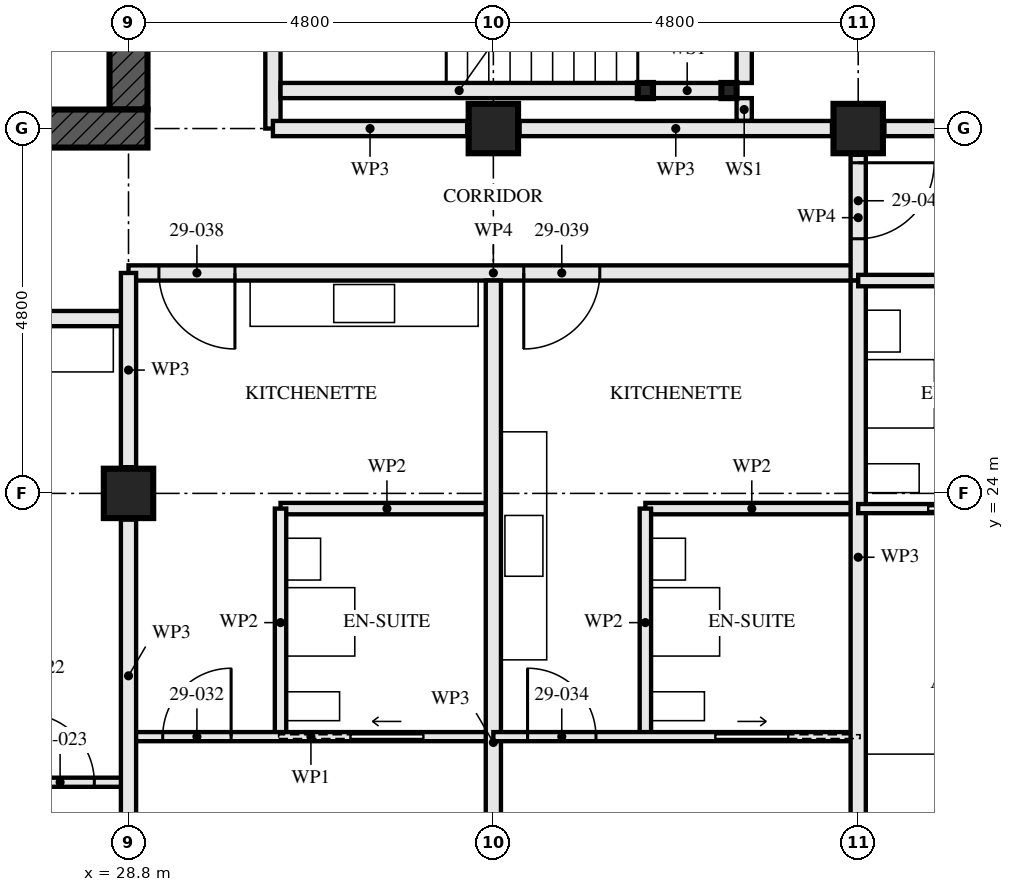
"""IFC4 building model, lengths in metres.
Left out: names, types, materials, properties, quantities, classifications, styles, units other than length and angle.
Written with IfcOpenShell. Run it as: python <this file> out.ifc"""

import sys

from ifc_helpers import new_model, si_unit, direction, frame, frame_2d, origin, origin_2d, place, context, subcontext, project, spatial, rectangle, hollow_rectangle, extrude, element, fill, save


model = new_model("IFC4")
c1 = context("Model", 3, precision=1e-05, world=origin(), true_north=direction((0.0, 1.0)))
c2 = subcontext(c1, "Body", "Model", "MODEL_VIEW")
j1 = project(units=[si_unit("LENGTHUNIT", "METRE"), si_unit("PLANEANGLEUNIT", "RADIAN")], contexts=[c1])
p1 = place(None, origin())
s1 = spatial("IfcSite", under=j1, at=p1, CompositionType="ELEMENT")
p2 = place(p1, origin())
s2 = spatial("IfcBuilding", under=s1, at=p2, CompositionType="ELEMENT")
p3 = place(p2, frame((0.0, 0.0, 108.5)))
s3 = spatial("IfcBuildingStorey", under=s2, at=p3, CompositionType="ELEMENT", Elevation=108.5)
for number, where, z_axis, x_axis in (
    (1, (28.8, 24.0, 0.0), (0.0, 0.0, 1.0), (1.0, 0.0, 0.0)),
    (2, (33.6, 28.8, 0.0), (0.0, 0.0, 1.0), (0.0, 1.0, 0.0)),
    (3, (38.4, 28.8, 0.0), (0.0, 0.0, 1.0), (0.0, 1.0, 0.0)),
):
    element("IfcColumn", number, at=place(p3, frame(where, z_axis=z_axis, x_axis=x_axis)), inside=s3, PredefinedType="COLUMN", context=c2, shape_type="SweptSolid", body=[
        extrude(hollow_rectangle(XDim=0.65, YDim=0.65, WallThickness=0.05, at=origin_2d()), origin(), (0.0, 0.0, 1.0), 3.5),
    ])
p4 = place(p3, frame((14.15, 28.8, -0.17), z_axis=(0.0, 0.0, 1.0), x_axis=(1.0, 0.0, 0.0)))
e4 = element("IfcWall", 4, at=p4, inside=s3, PredefinedType="SHEAR", context=c2, shape_type="SweptSolid", body=[
    extrude(rectangle(XDim=14.9, YDim=0.5, at=frame_2d((7.45, 0.0))), origin(), (0.0, 0.0, 1.0), 3.5),
])
p5 = place(p4, frame((6.85, 0.0, 0.17)))
e5 = element("IfcOpeningElement", 5, at=p5, cuts=e4, PredefinedType="OPENING", context=c2, shape_type="SweptSolid", body=[
    extrude(rectangle(XDim=1.2, YDim=2.1, at=frame_2d((0.6, 1.05))), frame((0.0, 0.26, 0.0), z_axis=(0.0, -1.0, 0.0), x_axis=(1.0, 0.0, 0.0)), (0.0, 0.0, 1.0), 0.521),
])
p6 = place(p3, frame((28.8, 29.05, -0.17), z_axis=(0.0, 0.0, 1.0), x_axis=(0.0, 1.0, 0.0)))
e6 = element("IfcWall", 6, at=p6, inside=s3, PredefinedType="SHEAR", context=c2, shape_type="SweptSolid", body=[
    extrude(rectangle(XDim=13.9, YDim=0.5, at=frame_2d((6.95, 0.0))), origin(), (0.0, 0.0, 1.0), 3.5),
])
p7 = place(p6, frame((6.35, 0.0, 0.17)))
e7 = element("IfcOpeningElement", 7, at=p7, cuts=e6, PredefinedType="OPENING", context=c2, shape_type="SweptSolid", body=[
    extrude(rectangle(XDim=1.2, YDim=2.1, at=frame_2d((0.6, 1.05))), frame((0.0, 0.26, 0.0), z_axis=(0.0, -1.0, 0.0), x_axis=(1.0, 0.0, 0.0)), (0.0, 0.0, 1.0), 0.521),
])
for number, where, z_axis, x_axis in (
    (8, (36.7, 29.3, 0.0), (0.0, 0.0, 1.0), (1.0, 0.0, 0.0)),
    (9, (35.6, 29.3, 0.0), (0.0, 0.0, 1.0), (1.0, 0.0, 0.0)),
):
    element("IfcColumn", number, at=place(p3, frame(where, z_axis=z_axis, x_axis=x_axis)), inside=s3, PredefinedType="COLUMN", context=c2, shape_type="SweptSolid", body=[
        extrude(hollow_rectangle(XDim=0.2, YDim=0.2, WallThickness=0.008, at=origin_2d()), origin(), (0.0, 0.0, 1.0), 3.33),
    ])
p8 = place(p3, frame((24.0, 20.2, 0.0), z_axis=(0.0, 0.0, 1.0), x_axis=(1.0, 0.0, 0.0)))
e10 = element("IfcWall", 10, at=p8, inside=s3, PredefinedType="PARTITIONING", context=c2, shape_type="SweptSolid", body=[
    extrude(rectangle(XDim=4.8, YDim=0.12, at=frame_2d((2.4, 0.0))), origin(), (0.0, 0.0, 1.0), 3.33),
])
p9 = place(p8, frame((3.45, 0.0, 0.0)))
e11 = element("IfcOpeningElement", 11, at=p9, cuts=e10, PredefinedType="OPENING", context=c2, shape_type="SweptSolid", body=[
    extrude(rectangle(XDim=0.9, YDim=2.1, at=frame_2d((0.45, 1.05))), frame((0.0, 0.071, 0.0), z_axis=(0.0, -1.0, 0.0), x_axis=(1.0, 0.0, 0.0)), (0.0, 0.0, 1.0), 0.141),
])
p10 = place(p3, frame((17.8, 26.3, 0.0), z_axis=(0.0, 0.0, 1.0), x_axis=(1.0, 0.0, 0.0)))
e12 = element("IfcWall", 12, at=p10, inside=s3, PredefinedType="PARTITIONING", context=c2, shape_type="SweptSolid", body=[
    extrude(rectangle(XDim=11.0, YDim=0.2, at=frame_2d((5.5, 0.0))), origin(), (0.0, 0.0, 1.0), 2.55),
])
p11 = place(p10, frame((0.06, 0.0, 0.0)))
e13 = element("IfcOpeningElement", 13, at=p11, cuts=e12, PredefinedType="OPENING", context=c2, shape_type="SweptSolid", body=[
    extrude(rectangle(XDim=1.0, YDim=2.1, at=frame_2d((0.5, 1.05))), frame((0.0, 0.111, 0.0), z_axis=(0.0, -1.0, 0.0), x_axis=(1.0, 0.0, 0.0)), (0.0, 0.0, 1.0), 0.221),
])
p12 = place(p10, frame((6.6, 0.0, 0.0)))
e14 = element("IfcOpeningElement", 14, at=p12, cuts=e12, PredefinedType="OPENING", context=c2, shape_type="SweptSolid", body=[
    extrude(rectangle(XDim=1.0, YDim=2.1, at=frame_2d((0.5, 1.05))), frame((0.0, 0.111, 0.0), z_axis=(0.0, -1.0, 0.0), x_axis=(1.0, 0.0, 0.0)), (0.0, 0.0, 1.0), 0.221),
])
p13 = place(p3, frame((30.8, 20.8, 0.0), z_axis=(0.0, 0.0, 1.0), x_axis=(0.0, 1.0, 0.0)))
e15 = element("IfcWall", 15, at=p13, inside=s3, PredefinedType="PARTITIONING", context=c2, shape_type="SweptSolid", body=[
    extrude(rectangle(XDim=3.0, YDim=0.15, at=frame_2d((1.5, 0.0))), origin(), (0.0, 0.0, 1.0), 3.33),
])
p14 = place(p3, frame((30.8, 23.8, 0.0), z_axis=(0.0, 0.0, 1.0), x_axis=(1.0, 0.0, 0.0)))
e16 = element("IfcWall", 16, at=p14, inside=s3, PredefinedType="PARTITIONING", context=c2, shape_type="SweptSolid", body=[
    extrude(rectangle(XDim=2.8, YDim=0.15, at=frame_2d((1.4, 0.0))), origin(), (0.0, 0.0, 1.0), 3.33),
])
p15 = place(p3, frame((28.8, 20.8, 0.0), z_axis=(0.0, 0.0, 1.0), x_axis=(1.0, 0.0, 0.0)))
e17 = element("IfcWall", 17, at=p15, inside=s3, PredefinedType="PARTITIONING", context=c2, shape_type="SweptSolid", body=[
    extrude(rectangle(XDim=4.8, YDim=0.12, at=frame_2d((2.4, 0.0))), origin(), (0.0, 0.0, 1.0), 3.33),
])
p16 = place(p15, frame((0.45, 0.0, 0.0)))
e18 = element("IfcOpeningElement", 18, at=p16, cuts=e17, PredefinedType="OPENING", context=c2, shape_type="SweptSolid", body=[
    extrude(rectangle(XDim=0.9, YDim=2.1, at=frame_2d((0.45, 1.05))), frame((0.0, 0.071, 0.0), z_axis=(0.0, -1.0, 0.0), x_axis=(1.0, 0.0, 0.0)), (0.0, 0.0, 1.0), 0.141),
])
p17 = place(p15, frame((2.925, 0.0, 0.0)))
e19 = element("IfcOpeningElement", 19, at=p17, cuts=e17, PredefinedType="OPENING", context=c2, shape_type="SweptSolid", body=[
    extrude(rectangle(XDim=0.95, YDim=2.1, at=frame_2d((0.475, 1.05))), frame((0.0, 0.071, 0.0), z_axis=(0.0, -1.0, 0.0), x_axis=(1.0, 0.0, 0.0)), (0.0, 0.0, 1.0), 0.141),
])
p18 = place(p3, frame((33.6, 14.647, 0.0), z_axis=(0.0, 0.0, 1.0), x_axis=(0.0, 1.0, 0.0)))
e20 = element("IfcWall", 20, at=p18, inside=s3, PredefinedType="PARTITIONING", context=c2, shape_type="SweptSolid", body=[
    extrude(rectangle(XDim=12.153, YDim=0.2, at=frame_2d((6.077, 0.0))), origin(), (0.0, 0.0, 1.0), 2.55),
])
p19 = place(p3, frame((35.6, 20.8, 0.0), z_axis=(0.0, 0.0, 1.0), x_axis=(0.0, 1.0, 0.0)))
e21 = element("IfcWall", 21, at=p19, inside=s3, PredefinedType="PARTITIONING", context=c2, shape_type="SweptSolid", body=[
    extrude(rectangle(XDim=3.0, YDim=0.15, at=frame_2d((1.5, 0.0))), origin(), (0.0, 0.0, 1.0), 3.33),
])
p20 = place(p3, frame((35.6, 23.8, 0.0), z_axis=(0.0, 0.0, 1.0), x_axis=(1.0, 0.0, 0.0)))
e22 = element("IfcWall", 22, at=p20, inside=s3, PredefinedType="PARTITIONING", context=c2, shape_type="SweptSolid", body=[
    extrude(rectangle(XDim=2.8, YDim=0.15, at=frame_2d((1.4, 0.0))), origin(), (0.0, 0.0, 1.0), 3.33),
])
p21 = place(p3, frame((33.6, 20.8, 0.0), z_axis=(0.0, 0.0, 1.0), x_axis=(1.0, 0.0, 0.0)))
e23 = element("IfcWall", 23, at=p21, inside=s3, PredefinedType="PARTITIONING", context=c2, shape_type="SweptSolid", body=[
    extrude(rectangle(XDim=4.8, YDim=0.12, at=frame_2d((2.4, 0.0))), origin(), (0.0, 0.0, 1.0), 3.33),
])
p22 = place(p21, frame((0.45, 0.0, 0.0)))
e24 = element("IfcOpeningElement", 24, at=p22, cuts=e23, PredefinedType="OPENING", context=c2, shape_type="SweptSolid", body=[
    extrude(rectangle(XDim=0.9, YDim=2.1, at=frame_2d((0.45, 1.05))), frame((0.0, 0.071, 0.0), z_axis=(0.0, -1.0, 0.0), x_axis=(1.0, 0.0, 0.0)), (0.0, 0.0, 1.0), 0.141),
])
p23 = place(p21, frame((2.925, 0.0, 0.0)))
e25 = element("IfcOpeningElement", 25, at=p23, cuts=e23, PredefinedType="OPENING", context=c2, shape_type="SweptSolid", body=[
    extrude(rectangle(XDim=0.95, YDim=2.1, at=frame_2d((0.475, 1.05))), frame((0.0, 0.071, 0.0), z_axis=(0.0, -1.0, 0.0), x_axis=(1.0, 0.0, 0.0)), (0.0, 0.0, 1.0), 0.141),
])
p24 = place(p3, frame((38.4, 19.52, 0.0), z_axis=(0.0, 0.0, 1.0), x_axis=(0.0, 1.0, 0.0)))
e26 = element("IfcWall", 26, at=p24, inside=s3, PredefinedType="PARTITIONING", context=c2, shape_type="SweptSolid", body=[
    extrude(rectangle(XDim=7.28, YDim=0.2, at=frame_2d((3.64, 0.0))), origin(), (0.0, 0.0, 1.0), 2.55),
])
p25 = place(p3, frame((38.4, 26.8, 0.0), z_axis=(0.0, 0.0, 1.0), x_axis=(1.0, 0.0, 0.0)))
e27 = element("IfcWall", 27, at=p25, inside=s3, PredefinedType="PARTITIONING", context=c2, shape_type="SweptSolid", body=[
    extrude(rectangle(XDim=2.8, YDim=0.15, at=frame_2d((1.4, 0.0))), origin(), (0.0, 0.0, 1.0), 3.33),
])
p26 = place(p3, frame((38.4, 23.8, 0.0), z_axis=(0.0, 0.0, 1.0), x_axis=(1.0, 0.0, 0.0)))
e28 = element("IfcWall", 28, at=p26, inside=s3, PredefinedType="PARTITIONING", context=c2, shape_type="SweptSolid", body=[
    extrude(rectangle(XDim=4.553, YDim=0.12, at=frame_2d((2.276, 0.0))), origin(), (0.0, 0.0, 1.0), 3.33),
])
p27 = place(p26, frame((2.975, 0.0, 0.0)))
e29 = element("IfcOpeningElement", 29, at=p27, cuts=e28, PredefinedType="OPENING", context=c2, shape_type="SweptSolid", body=[
    extrude(rectangle(XDim=0.9, YDim=2.1, at=frame_2d((0.45, 1.05))), frame((0.0, 0.071, 0.0), z_axis=(0.0, -1.0, 0.0), x_axis=(1.0, 0.0, 0.0)), (0.0, 0.0, 1.0), 0.141),
])
p28 = place(p26, frame((0.925, 0.0, 0.0)))
e30 = element("IfcOpeningElement", 30, at=p28, cuts=e28, PredefinedType="OPENING", context=c2, shape_type="SweptSolid", body=[
    extrude(rectangle(XDim=0.95, YDim=2.1, at=frame_2d((0.475, 1.05))), frame((0.0, 0.071, 0.0), z_axis=(0.0, -1.0, 0.0), x_axis=(1.0, 0.0, 0.0)), (0.0, 0.0, 1.0), 0.141),
])
p29 = place(p3, frame((28.8, 26.9, 0.0), z_axis=(0.0, 0.0, 1.0), x_axis=(1.0, 0.0, 0.0)))
e31 = element("IfcWall", 31, at=p29, inside=s3, PredefinedType="PARTITIONING", context=c2, shape_type="SweptSolid", body=[
    extrude(rectangle(XDim=9.6, YDim=0.2, at=frame_2d((4.8, 0.0))), origin(), (0.0, 0.0, 1.0), 3.33),
])
p30 = place(p29, frame((0.4, 0.0, 0.0)))
e32 = element("IfcOpeningElement", 32, at=p30, cuts=e31, PredefinedType="OPENING", context=c2, shape_type="SweptSolid", body=[
    extrude(rectangle(XDim=1.0, YDim=2.1, at=frame_2d((0.5, 1.05))), frame((0.0, 0.111, 0.0), z_axis=(0.0, -1.0, 0.0), x_axis=(1.0, 0.0, 0.0)), (0.0, 0.0, 1.0), 0.221),
])
p31 = place(p29, frame((5.2, 0.0, 0.0)))
e33 = element("IfcOpeningElement", 33, at=p31, cuts=e31, PredefinedType="OPENING", context=c2, shape_type="SweptSolid", body=[
    extrude(rectangle(XDim=1.0, YDim=2.1, at=frame_2d((0.5, 1.05))), frame((0.0, 0.111, 0.0), z_axis=(0.0, -1.0, 0.0), x_axis=(1.0, 0.0, 0.0)), (0.0, 0.0, 1.0), 0.221),
])
p32 = place(p3, frame((38.4, 26.8, 0.0), z_axis=(0.0, 0.0, 1.0), x_axis=(0.0, 1.0, 0.0)))
e34 = element("IfcWall", 34, at=p32, inside=s3, PredefinedType="PARTITIONING", context=c2, shape_type="SweptSolid", body=[
    extrude(rectangle(XDim=1.655, YDim=0.2, at=frame_2d((0.828, 0.0))), origin(), (0.0, 0.0, 1.0), 3.33),
])
p33 = place(p32, frame((0.55, 0.0, 0.0)))
e35 = element("IfcOpeningElement", 35, at=p33, cuts=e34, PredefinedType="OPENING", context=c2, shape_type="SweptSolid", body=[
    extrude(rectangle(XDim=1.0, YDim=2.1, at=frame_2d((0.5, 1.05))), frame((0.0, 0.111, 0.0), z_axis=(0.0, -1.0, 0.0), x_axis=(1.0, 0.0, 0.0)), (0.0, 0.0, 1.0), 0.221),
])
p34 = place(p3, frame((36.6, 29.3, 0.0), z_axis=(0.0, 0.0, 1.0), x_axis=(-1.0, 0.0, 0.0)))
e36 = element("IfcWall", 36, at=p34, inside=s3, PredefinedType="SOLIDWALL", context=c2, shape_type="SweptSolid", body=[
    extrude(rectangle(XDim=0.9, YDim=0.2, at=frame_2d((0.45, 0.0))), origin(), (0.0, 0.0, 1.0), 2.99),
])
p35 = place(p3, frame((35.5, 29.3, 0.0), z_axis=(0.0, 0.0, 1.0), x_axis=(-1.0, 0.0, 0.0)))
e37 = element("IfcWall", 37, at=p35, inside=s3, PredefinedType="SOLIDWALL", context=c2, shape_type="SweptSolid", body=[
    extrude(rectangle(XDim=4.7, YDim=0.2, at=frame_2d((2.35, 0.0))), origin(), (0.0, 0.0, 1.0), 2.99),
])
p36 = place(p3, frame((36.9, 28.9, 0.0), z_axis=(0.0, 0.0, 1.0), x_axis=(0.0, 1.0, 0.0)))
e38 = element("IfcWall", 38, at=p36, inside=s3, PredefinedType="SOLIDWALL", context=c2, shape_type="SweptSolid", body=[
    extrude(rectangle(XDim=0.3, YDim=0.2, at=frame_2d((0.15, 0.0))), origin(), (0.0, 0.0, 1.0), 3.33),
])
p37 = place(p3, frame((36.9, 29.4, 0.0), z_axis=(0.0, 0.0, 1.0), x_axis=(0.0, 1.0, 0.0)))
e39 = element("IfcWall", 39, at=p37, inside=s3, PredefinedType="SOLIDWALL", context=c2, shape_type="SweptSolid", body=[
    extrude(rectangle(XDim=2.6, YDim=0.2, at=frame_2d((1.3, 0.0))), origin(), (0.0, 0.0, 1.0), 3.33),
])
p38 = place(p3, frame((30.7, 28.8, 0.0), z_axis=(0.0, 0.0, 1.0), x_axis=(0.0, 1.0, 0.0)))
e40 = element("IfcWall", 40, at=p38, inside=s3, PredefinedType="PARTITIONING", context=c2, shape_type="SweptSolid", body=[
    extrude(rectangle(XDim=14.84, YDim=0.2, at=frame_2d((7.42, 0.0))), origin(), (0.0, 0.0, 1.0), 2.32),
])
p39 = place(p38, frame((1.4, 0.0, 0.0)))
e41 = element("IfcOpeningElement", 41, at=p39, cuts=e40, PredefinedType="OPENING", context=c2, shape_type="SweptSolid", body=[
    extrude(rectangle(XDim=1.0, YDim=2.1, at=frame_2d((0.5, 1.05))), frame((0.0, 0.111, 0.0), z_axis=(0.0, -1.0, 0.0), x_axis=(1.0, 0.0, 0.0)), (0.0, 0.0, 1.0), 0.221),
])
p40 = place(p38, frame((4.1, 0.0, 0.0)))
e42 = element("IfcOpeningElement", 42, at=p40, cuts=e40, PredefinedType="OPENING", context=c2, shape_type="SweptSolid", body=[
    extrude(rectangle(XDim=1.0, YDim=2.1, at=frame_2d((0.5, 1.05))), frame((0.0, 0.111, 0.0), z_axis=(0.0, -1.0, 0.0), x_axis=(1.0, 0.0, 0.0)), (0.0, 0.0, 1.0), 0.221),
])
p41 = place(p38, frame((5.975, 0.0, 0.0)))
e43 = element("IfcOpeningElement", 43, at=p41, cuts=e40, PredefinedType="OPENING", context=c2, shape_type="SweptSolid", body=[
    extrude(rectangle(XDim=1.0, YDim=2.1, at=frame_2d((0.5, 1.05))), frame((0.0, 0.111, 0.0), z_axis=(0.0, -1.0, 0.0), x_axis=(1.0, 0.0, 0.0)), (0.0, 0.0, 1.0), 0.221),
])
p42 = place(p38, frame((13.0, 0.0, 0.0)))
e44 = element("IfcOpeningElement", 44, at=p42, cuts=e40, PredefinedType="OPENING", context=c2, shape_type="SweptSolid", body=[
    extrude(rectangle(XDim=1.0, YDim=2.1, at=frame_2d((0.5, 1.05))), frame((0.0, 0.111, 0.0), z_axis=(0.0, -1.0, 0.0), x_axis=(1.0, 0.0, 0.0)), (0.0, 0.0, 1.0), 0.221),
])
p43 = place(p3, frame((28.8, 19.545, 0.0), z_axis=(0.0, 0.0, 1.0), x_axis=(0.0, 1.0, 0.0)))
e45 = element("IfcWall", 45, at=p43, inside=s3, PredefinedType="PARTITIONING", context=c2, shape_type="SweptSolid", body=[
    extrude(rectangle(XDim=4.11, YDim=0.2, at=frame_2d((2.055, 0.0))), origin(), (0.0, 0.0, 1.0), 2.32),
])
p44 = place(p3, frame((28.8, 24.345, 0.0), z_axis=(0.0, 0.0, 1.0), x_axis=(0.0, 1.0, 0.0)))
e46 = element("IfcWall", 46, at=p44, inside=s3, PredefinedType="PARTITIONING", context=c2, shape_type="SweptSolid", body=[
    extrude(rectangle(XDim=2.555, YDim=0.2, at=frame_2d((1.277, 0.0))), origin(), (0.0, 0.0, 1.0), 2.32),
])
p45 = place(p3, frame((42.896, 28.8, 0.0), z_axis=(0.0, 0.0, 1.0), x_axis=(-1.0, 0.0, 0.0)))
e47 = element("IfcWall", 47, at=p45, inside=s3, PredefinedType="PARTITIONING", context=c2, shape_type="SweptSolid", body=[
    extrude(rectangle(XDim=4.15, YDim=0.2, at=frame_2d((2.075, 0.0))), origin(), (0.0, 0.0, 1.0), 2.32),
])
p46 = place(p3, frame((38.055, 28.8, 0.0), z_axis=(0.0, 0.0, 1.0), x_axis=(-1.0, 0.0, 0.0)))
e48 = element("IfcWall", 48, at=p46, inside=s3, PredefinedType="PARTITIONING", context=c2, shape_type="SweptSolid", body=[
    extrude(rectangle(XDim=4.11, YDim=0.2, at=frame_2d((2.055, 0.0))), origin(), (0.0, 0.0, 1.0), 2.32),
])
p47 = place(p3, frame((33.255, 28.8, 0.0), z_axis=(0.0, 0.0, 1.0), x_axis=(-1.0, 0.0, 0.0)))
e49 = element("IfcWall", 49, at=p47, inside=s3, PredefinedType="PARTITIONING", context=c2, shape_type="SweptSolid", body=[
    extrude(rectangle(XDim=2.555, YDim=0.2, at=frame_2d((1.277, 0.0))), origin(), (0.0, 0.0, 1.0), 2.32),
])
p48 = place(p9, origin())
e50 = element("IfcDoor", 50, at=p48, inside=s3, OperationType="SINGLE_SWING_RIGHT", PredefinedType="DOOR", context=c2, shape_type="SweptSolid", body=[
    extrude(rectangle(XDim=0.9, YDim=2.1, at=frame_2d((0.45, 1.05))), frame((0.0, 0.022, 0.0), z_axis=(0.0, -1.0, 0.0), x_axis=(1.0, 0.0, 0.0)), (0.0, 0.0, 1.0), 0.044),
])
fill(e11, e50)
p49 = place(p16, origin())
e51 = element("IfcDoor", 51, at=p49, inside=s3, OperationType="SINGLE_SWING_LEFT", PredefinedType="DOOR", context=c2, shape_type="SweptSolid", body=[
    extrude(rectangle(XDim=0.9, YDim=2.1, at=frame_2d((0.45, 1.05))), frame((0.0, 0.022, 0.0), z_axis=(0.0, -1.0, 0.0), x_axis=(1.0, 0.0, 0.0)), (0.0, 0.0, 1.0), 0.044),
])
fill(e18, e51)
p50 = place(p17, origin())
e52 = element("IfcDoor", 52, at=p50, inside=s3, OperationType="SLIDING_TO_RIGHT", PredefinedType="DOOR", context=c2, shape_type="SweptSolid", body=[
    extrude(rectangle(XDim=0.95, YDim=2.1, at=frame_2d((0.475, 1.05))), frame((0.0, 0.022, 0.0), z_axis=(0.0, -1.0, 0.0), x_axis=(1.0, 0.0, 0.0)), (0.0, 0.0, 1.0), 0.044),
])
fill(e19, e52)
p51 = place(p22, origin())
e53 = element("IfcDoor", 53, at=p51, inside=s3, OperationType="SINGLE_SWING_RIGHT", PredefinedType="DOOR", context=c2, shape_type="SweptSolid", body=[
    extrude(rectangle(XDim=0.9, YDim=2.1, at=frame_2d((0.45, 1.05))), frame((0.0, 0.022, 0.0), z_axis=(0.0, -1.0, 0.0), x_axis=(1.0, 0.0, 0.0)), (0.0, 0.0, 1.0), 0.044),
])
fill(e24, e53)
p52 = place(p23, origin())
e54 = element("IfcDoor", 54, at=p52, inside=s3, OperationType="SLIDING_TO_LEFT", PredefinedType="DOOR", context=c2, shape_type="SweptSolid", body=[
    extrude(rectangle(XDim=0.95, YDim=2.1, at=frame_2d((0.475, 1.05))), frame((0.0, 0.022, 0.0), z_axis=(0.0, -1.0, 0.0), x_axis=(1.0, 0.0, 0.0)), (0.0, 0.0, 1.0), 0.044),
])
fill(e25, e54)
p53 = place(p28, origin())
e55 = element("IfcDoor", 55, at=p53, inside=s3, OperationType="SLIDING_TO_LEFT", PredefinedType="DOOR", context=c2, shape_type="SweptSolid", body=[
    extrude(rectangle(XDim=0.95, YDim=2.1, at=frame_2d((0.475, 1.05))), frame((0.0, 0.022, 0.0), z_axis=(0.0, -1.0, 0.0), x_axis=(1.0, 0.0, 0.0)), (0.0, 0.0, 1.0), 0.044),
])
fill(e30, e55)
p54 = place(p30, frame((1.0, 0.0, 0.0), z_axis=(0.0, 0.0, 1.0), x_axis=(-1.0, 0.0, 0.0)))
e56 = element("IfcDoor", 56, at=p54, inside=s3, OperationType="SINGLE_SWING_RIGHT", PredefinedType="DOOR", context=c2, shape_type="SweptSolid", body=[
    extrude(rectangle(XDim=1.0, YDim=2.1, at=frame_2d((0.5, 1.05))), frame((0.0, 0.027, 0.0), z_axis=(0.0, -1.0, 0.0), x_axis=(1.0, 0.0, 0.0)), (0.0, 0.0, 1.0), 0.054),
])
fill(e32, e56)
p55 = place(p31, frame((1.0, 0.0, 0.0), z_axis=(0.0, 0.0, 1.0), x_axis=(-1.0, 0.0, 0.0)))
e57 = element("IfcDoor", 57, at=p55, inside=s3, OperationType="SINGLE_SWING_LEFT", PredefinedType="DOOR", context=c2, shape_type="SweptSolid", body=[
    extrude(rectangle(XDim=1.0, YDim=2.1, at=frame_2d((0.5, 1.05))), frame((0.0, 0.027, 0.0), z_axis=(0.0, -1.0, 0.0), x_axis=(1.0, 0.0, 0.0)), (0.0, 0.0, 1.0), 0.054),
])
fill(e33, e57)
p56 = place(p33, frame((1.0, 0.0, 0.0), z_axis=(0.0, 0.0, 1.0), x_axis=(-1.0, 0.0, 0.0)))
e58 = element("IfcDoor", 58, at=p56, inside=s3, OperationType="SINGLE_SWING_RIGHT", PredefinedType="DOOR", context=c2, shape_type="SweptSolid", body=[
    extrude(rectangle(XDim=1.0, YDim=2.1, at=frame_2d((0.5, 1.05))), frame((0.0, 0.027, 0.0), z_axis=(0.0, -1.0, 0.0), x_axis=(1.0, 0.0, 0.0)), (0.0, 0.0, 1.0), 0.054),
])
fill(e35, e58)
save(model, sys.argv[1])
